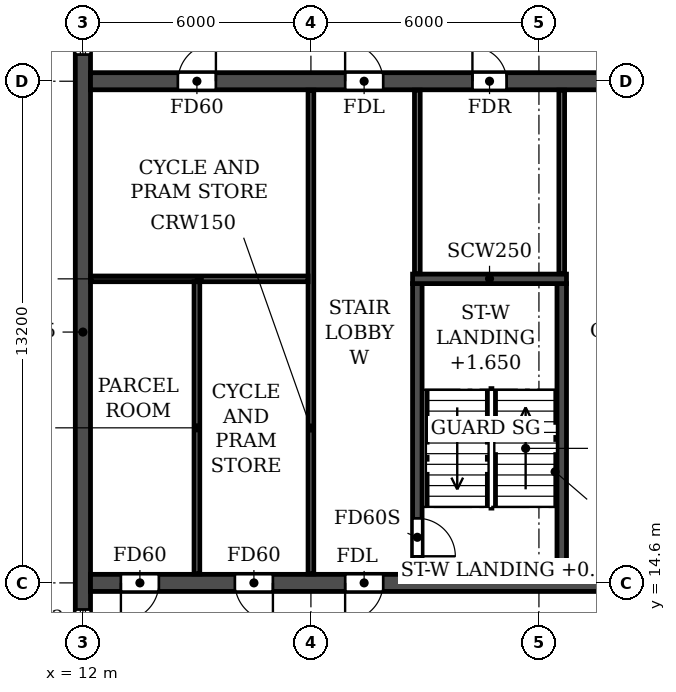
"""IFC4 building model, lengths in metres.
Left out: names, types, materials, properties, quantities, classifications, styles, units other than length and angle.
Written with IfcOpenShell. Run it as: python <this file> out.ifc"""

import sys

from ifc_helpers import new_model, si_unit, direction, frame, frame_2d, origin, place, context, subcontext, project, spatial, rectangle, extrude, element, fill, save


model = new_model("IFC4")
c1 = context("Model", 3, precision=1e-05, world=origin(), true_north=direction((0.0, 1.0)))
c2 = subcontext(c1, "Body", "Model", "MODEL_VIEW")
j1 = project(units=[si_unit("LENGTHUNIT", "METRE"), si_unit("PLANEANGLEUNIT", "RADIAN")], contexts=[c1])
p1 = place(None, origin())
s1 = spatial("IfcSite", under=j1, at=p1, CompositionType="ELEMENT")
p2 = place(p1, origin())
s2 = spatial("IfcBuilding", under=s1, at=p2, CompositionType="ELEMENT")
p3 = place(p2, frame((0.0, 0.0, 142.2)))
s3 = spatial("IfcBuildingStorey", under=s2, at=p3, CompositionType="ELEMENT", Elevation=142.2)
p4 = place(p3, frame((12.0, 4.683, 0.0), z_axis=(0.0, 0.0, 1.0), x_axis=(0.0, 1.0, 0.0)))
e1 = element("IfcWall", 1, at=p4, inside=s3, PredefinedType="SHEAR", context=c2, shape_type="SweptSolid", body=[
    extrude(rectangle(XDim=33.034, YDim=0.4, at=frame_2d((16.517, 0.0))), origin(), (0.0, 0.0, 1.0), 3.07),
])
p5 = place(p4, frame((23.817, 0.0, 0.9)))
e2 = element("IfcOpeningElement", 2, at=p5, cuts=e1, PredefinedType="OPENING", context=c2, shape_type="SweptSolid", body=[
    extrude(rectangle(XDim=1.2, YDim=1.5, at=frame_2d((0.6, 0.75))), frame((0.0, 0.21, 0.0), z_axis=(0.0, -1.0, 0.0), x_axis=(1.0, 0.0, 0.0)), (0.0, 0.0, 1.0), 0.42),
])
p6 = place(p4, frame((8.017, 0.0, 0.9)))
e3 = element("IfcOpeningElement", 3, at=p6, cuts=e1, PredefinedType="OPENING", context=c2, shape_type="SweptSolid", body=[
    extrude(rectangle(XDim=1.2, YDim=1.5, at=frame_2d((0.6, 0.75))), frame((0.0, 0.21, 0.0), z_axis=(0.0, -1.0, 0.0), x_axis=(1.0, 0.0, 0.0)), (0.0, 0.0, 1.0), 0.42),
])
p7 = place(p4, frame((28.293, 0.0, 0.6)))
e4 = element("IfcOpeningElement", 4, at=p7, cuts=e1, PredefinedType="OPENING", context=c2, shape_type="SweptSolid", body=[
    extrude(rectangle(XDim=2.2, YDim=1.8, at=frame_2d((1.1, 0.9))), frame((0.0, 0.21, 0.0), z_axis=(0.0, -1.0, 0.0), x_axis=(1.0, 0.0, 0.0)), (0.0, 0.0, 1.0), 0.42),
])
p8 = place(p4, frame((2.541, 0.0, 0.6)))
e5 = element("IfcOpeningElement", 5, at=p8, cuts=e1, PredefinedType="OPENING", context=c2, shape_type="SweptSolid", body=[
    extrude(rectangle(XDim=2.2, YDim=1.8, at=frame_2d((1.1, 0.9))), frame((0.0, 0.21, 0.0), z_axis=(0.0, -1.0, 0.0), x_axis=(1.0, 0.0, 0.0)), (0.0, 0.0, 1.0), 0.42),
])
p9 = place(p3, frame((12.2, 14.6, 0.0), z_axis=(0.0, 0.0, 1.0), x_axis=(1.0, 0.0, 0.0)))
e6 = element("IfcWall", 6, at=p9, inside=s3, PredefinedType="SOLIDWALL", context=c2, shape_type="SweptSolid", body=[
    extrude(rectangle(XDim=77.6, YDim=0.45, at=frame_2d((38.8, 0.0))), origin(), (0.0, 0.0, 1.0), 3.07),
])
p10 = place(p9, frame((0.8, 0.0, 0.0)))
e7 = element("IfcOpeningElement", 7, at=p10, cuts=e6, PredefinedType="OPENING", context=c2, shape_type="SweptSolid", body=[
    extrude(rectangle(XDim=1.0, YDim=2.1, at=frame_2d((0.5, 1.05))), frame((0.0, 0.235, 0.0), z_axis=(0.0, -1.0, 0.0), x_axis=(1.0, 0.0, 0.0)), (0.0, 0.0, 1.0), 0.47),
])
p11 = place(p9, frame((3.8, 0.0, 0.0)))
e8 = element("IfcOpeningElement", 8, at=p11, cuts=e6, PredefinedType="OPENING", context=c2, shape_type="SweptSolid", body=[
    extrude(rectangle(XDim=1.0, YDim=2.1, at=frame_2d((0.5, 1.05))), frame((0.0, 0.235, 0.0), z_axis=(0.0, -1.0, 0.0), x_axis=(1.0, 0.0, 0.0)), (0.0, 0.0, 1.0), 0.47),
])
p12 = place(p9, frame((6.7, 0.0, 0.0)))
e9 = element("IfcOpeningElement", 9, at=p12, cuts=e6, PredefinedType="OPENING", context=c2, shape_type="SweptSolid", body=[
    extrude(rectangle(XDim=1.0, YDim=2.1, at=frame_2d((0.5, 1.05))), frame((0.0, 0.235, 0.0), z_axis=(0.0, -1.0, 0.0), x_axis=(1.0, 0.0, 0.0)), (0.0, 0.0, 1.0), 0.47),
])
p13 = place(p9, frame((14.6, 0.0, 0.0)))
e10 = element("IfcOpeningElement", 10, at=p13, cuts=e6, PredefinedType="OPENING", context=c2, shape_type="SweptSolid", body=[
    extrude(rectangle(XDim=1.0, YDim=2.1, at=frame_2d((0.5, 1.05))), frame((0.0, 0.235, 0.0), z_axis=(0.0, -1.0, 0.0), x_axis=(1.0, 0.0, 0.0)), (0.0, 0.0, 1.0), 0.47),
])
p14 = place(p9, frame((19.2, 0.0, 0.0)))
e11 = element("IfcOpeningElement", 11, at=p14, cuts=e6, PredefinedType="OPENING", context=c2, shape_type="SweptSolid", body=[
    extrude(rectangle(XDim=1.0, YDim=2.1, at=frame_2d((0.5, 1.05))), frame((0.0, 0.235, 0.0), z_axis=(0.0, -1.0, 0.0), x_axis=(1.0, 0.0, 0.0)), (0.0, 0.0, 1.0), 0.47),
])
p15 = place(p9, frame((33.1, 0.0, 0.0)))
e12 = element("IfcOpeningElement", 12, at=p15, cuts=e6, PredefinedType="OPENING", context=c2, shape_type="SweptSolid", body=[
    extrude(rectangle(XDim=1.0, YDim=2.1, at=frame_2d((0.5, 1.05))), frame((0.0, 0.235, 0.0), z_axis=(0.0, -1.0, 0.0), x_axis=(1.0, 0.0, 0.0)), (0.0, 0.0, 1.0), 0.47),
])
p16 = place(p9, frame((38.3, 0.0, 0.0)))
e13 = element("IfcOpeningElement", 13, at=p16, cuts=e6, PredefinedType="OPENING", context=c2, shape_type="SweptSolid", body=[
    extrude(rectangle(XDim=1.0, YDim=2.1, at=frame_2d((0.5, 1.05))), frame((0.0, 0.235, 0.0), z_axis=(0.0, -1.0, 0.0), x_axis=(1.0, 0.0, 0.0)), (0.0, 0.0, 1.0), 0.47),
])
p17 = place(p9, frame((40.9, 0.0, 0.0)))
e14 = element("IfcOpeningElement", 14, at=p17, cuts=e6, PredefinedType="OPENING", context=c2, shape_type="SweptSolid", body=[
    extrude(rectangle(XDim=1.0, YDim=2.1, at=frame_2d((0.5, 1.05))), frame((0.0, 0.235, 0.0), z_axis=(0.0, -1.0, 0.0), x_axis=(1.0, 0.0, 0.0)), (0.0, 0.0, 1.0), 0.47),
])
p18 = place(p9, frame((44.8, 0.0, 0.0)))
e15 = element("IfcOpeningElement", 15, at=p18, cuts=e6, PredefinedType="OPENING", context=c2, shape_type="SweptSolid", body=[
    extrude(rectangle(XDim=1.0, YDim=2.1, at=frame_2d((0.5, 1.05))), frame((0.0, 0.235, 0.0), z_axis=(0.0, -1.0, 0.0), x_axis=(1.0, 0.0, 0.0)), (0.0, 0.0, 1.0), 0.47),
])
p19 = place(p9, frame((57.4, 0.0, 0.0)))
e16 = element("IfcOpeningElement", 16, at=p19, cuts=e6, PredefinedType="OPENING", context=c2, shape_type="SweptSolid", body=[
    extrude(rectangle(XDim=1.0, YDim=2.1, at=frame_2d((0.5, 1.05))), frame((0.0, 0.235, 0.0), z_axis=(0.0, -1.0, 0.0), x_axis=(1.0, 0.0, 0.0)), (0.0, 0.0, 1.0), 0.47),
])
p20 = place(p9, frame((62.0, 0.0, 0.0)))
e17 = element("IfcOpeningElement", 17, at=p20, cuts=e6, PredefinedType="OPENING", context=c2, shape_type="SweptSolid", body=[
    extrude(rectangle(XDim=1.0, YDim=2.1, at=frame_2d((0.5, 1.05))), frame((0.0, 0.235, 0.0), z_axis=(0.0, -1.0, 0.0), x_axis=(1.0, 0.0, 0.0)), (0.0, 0.0, 1.0), 0.47),
])
p21 = place(p9, frame((69.9, 0.0, 0.0)))
e18 = element("IfcOpeningElement", 18, at=p21, cuts=e6, PredefinedType="OPENING", context=c2, shape_type="SweptSolid", body=[
    extrude(rectangle(XDim=1.0, YDim=2.1, at=frame_2d((0.5, 1.05))), frame((0.0, 0.235, 0.0), z_axis=(0.0, -1.0, 0.0), x_axis=(1.0, 0.0, 0.0)), (0.0, 0.0, 1.0), 0.47),
])
p22 = place(p9, frame((72.8, 0.0, 0.0)))
e19 = element("IfcOpeningElement", 19, at=p22, cuts=e6, PredefinedType="OPENING", context=c2, shape_type="SweptSolid", body=[
    extrude(rectangle(XDim=1.0, YDim=2.1, at=frame_2d((0.5, 1.05))), frame((0.0, 0.235, 0.0), z_axis=(0.0, -1.0, 0.0), x_axis=(1.0, 0.0, 0.0)), (0.0, 0.0, 1.0), 0.47),
])
p23 = place(p9, frame((75.8, 0.0, 0.0)))
e20 = element("IfcOpeningElement", 20, at=p23, cuts=e6, PredefinedType="OPENING", context=c2, shape_type="SweptSolid", body=[
    extrude(rectangle(XDim=1.0, YDim=2.1, at=frame_2d((0.5, 1.05))), frame((0.0, 0.235, 0.0), z_axis=(0.0, -1.0, 0.0), x_axis=(1.0, 0.0, 0.0)), (0.0, 0.0, 1.0), 0.47),
])
p24 = place(p3, frame((12.2, 27.8, 0.0), z_axis=(0.0, 0.0, 1.0), x_axis=(1.0, 0.0, 0.0)))
e21 = element("IfcWall", 21, at=p24, inside=s3, PredefinedType="SOLIDWALL", context=c2, shape_type="SweptSolid", body=[
    extrude(rectangle(XDim=77.6, YDim=0.45, at=frame_2d((38.8, 0.0))), origin(), (0.0, 0.0, 1.0), 3.07),
])
p25 = place(p24, frame((2.3, 0.0, 0.0)))
e22 = element("IfcOpeningElement", 22, at=p25, cuts=e21, PredefinedType="OPENING", context=c2, shape_type="SweptSolid", body=[
    extrude(rectangle(XDim=1.0, YDim=2.1, at=frame_2d((0.5, 1.05))), frame((0.0, 0.235, 0.0), z_axis=(0.0, -1.0, 0.0), x_axis=(1.0, 0.0, 0.0)), (0.0, 0.0, 1.0), 0.47),
])
p26 = place(p24, frame((6.7, 0.0, 0.0)))
e23 = element("IfcOpeningElement", 23, at=p26, cuts=e21, PredefinedType="OPENING", context=c2, shape_type="SweptSolid", body=[
    extrude(rectangle(XDim=1.0, YDim=2.1, at=frame_2d((0.5, 1.05))), frame((0.0, 0.235, 0.0), z_axis=(0.0, -1.0, 0.0), x_axis=(1.0, 0.0, 0.0)), (0.0, 0.0, 1.0), 0.47),
])
p27 = place(p24, frame((10.05, 0.0, 0.0)))
e24 = element("IfcOpeningElement", 24, at=p27, cuts=e21, PredefinedType="OPENING", context=c2, shape_type="SweptSolid", body=[
    extrude(rectangle(XDim=0.9, YDim=2.1, at=frame_2d((0.45, 1.05))), frame((0.0, 0.235, 0.0), z_axis=(0.0, -1.0, 0.0), x_axis=(1.0, 0.0, 0.0)), (0.0, 0.0, 1.0), 0.47),
])
p28 = place(p24, frame((19.25, 0.0, 0.0)))
e25 = element("IfcOpeningElement", 25, at=p28, cuts=e21, PredefinedType="OPENING", context=c2, shape_type="SweptSolid", body=[
    extrude(rectangle(XDim=0.9, YDim=2.1, at=frame_2d((0.45, 1.05))), frame((0.0, 0.235, 0.0), z_axis=(0.0, -1.0, 0.0), x_axis=(1.0, 0.0, 0.0)), (0.0, 0.0, 1.0), 0.47),
])
p29 = place(p24, frame((23.7, 0.0, 0.0)))
e26 = element("IfcOpeningElement", 26, at=p29, cuts=e21, PredefinedType="OPENING", context=c2, shape_type="SweptSolid", body=[
    extrude(rectangle(XDim=1.0, YDim=2.1, at=frame_2d((0.5, 1.05))), frame((0.0, 0.235, 0.0), z_axis=(0.0, -1.0, 0.0), x_axis=(1.0, 0.0, 0.0)), (0.0, 0.0, 1.0), 0.47),
])
p30 = place(p24, frame((28.9, 0.0, 0.0)))
e27 = element("IfcOpeningElement", 27, at=p30, cuts=e21, PredefinedType="OPENING", context=c2, shape_type="SweptSolid", body=[
    extrude(rectangle(XDim=1.0, YDim=2.1, at=frame_2d((0.5, 1.05))), frame((0.0, 0.235, 0.0), z_axis=(0.0, -1.0, 0.0), x_axis=(1.0, 0.0, 0.0)), (0.0, 0.0, 1.0), 0.47),
])
p31 = place(p24, frame((35.4, 0.0, 0.0)))
e28 = element("IfcOpeningElement", 28, at=p31, cuts=e21, PredefinedType="OPENING", context=c2, shape_type="SweptSolid", body=[
    extrude(rectangle(XDim=1.0, YDim=2.1, at=frame_2d((0.5, 1.05))), frame((0.0, 0.235, 0.0), z_axis=(0.0, -1.0, 0.0), x_axis=(1.0, 0.0, 0.0)), (0.0, 0.0, 1.0), 0.47),
])
p32 = place(p24, frame((38.3, 0.0, 0.0)))
e29 = element("IfcOpeningElement", 29, at=p32, cuts=e21, PredefinedType="OPENING", context=c2, shape_type="SweptSolid", body=[
    extrude(rectangle(XDim=1.0, YDim=2.1, at=frame_2d((0.5, 1.05))), frame((0.0, 0.235, 0.0), z_axis=(0.0, -1.0, 0.0), x_axis=(1.0, 0.0, 0.0)), (0.0, 0.0, 1.0), 0.47),
])
p33 = place(p24, frame((41.2, 0.0, 0.0)))
e30 = element("IfcOpeningElement", 30, at=p33, cuts=e21, PredefinedType="OPENING", context=c2, shape_type="SweptSolid", body=[
    extrude(rectangle(XDim=1.0, YDim=2.1, at=frame_2d((0.5, 1.05))), frame((0.0, 0.235, 0.0), z_axis=(0.0, -1.0, 0.0), x_axis=(1.0, 0.0, 0.0)), (0.0, 0.0, 1.0), 0.47),
])
p34 = place(p24, frame((43.8, 0.0, 0.0)))
e31 = element("IfcOpeningElement", 31, at=p34, cuts=e21, PredefinedType="OPENING", context=c2, shape_type="SweptSolid", body=[
    extrude(rectangle(XDim=1.0, YDim=2.1, at=frame_2d((0.5, 1.05))), frame((0.0, 0.235, 0.0), z_axis=(0.0, -1.0, 0.0), x_axis=(1.0, 0.0, 0.0)), (0.0, 0.0, 1.0), 0.47),
])
p35 = place(p24, frame((46.4, 0.0, 0.0)))
e32 = element("IfcOpeningElement", 32, at=p35, cuts=e21, PredefinedType="OPENING", context=c2, shape_type="SweptSolid", body=[
    extrude(rectangle(XDim=1.0, YDim=2.1, at=frame_2d((0.5, 1.05))), frame((0.0, 0.235, 0.0), z_axis=(0.0, -1.0, 0.0), x_axis=(1.0, 0.0, 0.0)), (0.0, 0.0, 1.0), 0.47),
])
p36 = place(p24, frame((49.0, 0.0, 0.0)))
e33 = element("IfcOpeningElement", 33, at=p36, cuts=e21, PredefinedType="OPENING", context=c2, shape_type="SweptSolid", body=[
    extrude(rectangle(XDim=1.0, YDim=2.1, at=frame_2d((0.5, 1.05))), frame((0.0, 0.235, 0.0), z_axis=(0.0, -1.0, 0.0), x_axis=(1.0, 0.0, 0.0)), (0.0, 0.0, 1.0), 0.47),
])
p37 = place(p24, frame((52.9, 0.0, 0.0)))
e34 = element("IfcOpeningElement", 34, at=p37, cuts=e21, PredefinedType="OPENING", context=c2, shape_type="SweptSolid", body=[
    extrude(rectangle(XDim=1.0, YDim=2.1, at=frame_2d((0.5, 1.05))), frame((0.0, 0.235, 0.0), z_axis=(0.0, -1.0, 0.0), x_axis=(1.0, 0.0, 0.0)), (0.0, 0.0, 1.0), 0.47),
])
p38 = place(p24, frame((57.45, 0.0, 0.0)))
e35 = element("IfcOpeningElement", 35, at=p38, cuts=e21, PredefinedType="OPENING", context=c2, shape_type="SweptSolid", body=[
    extrude(rectangle(XDim=0.9, YDim=2.1, at=frame_2d((0.45, 1.05))), frame((0.0, 0.235, 0.0), z_axis=(0.0, -1.0, 0.0), x_axis=(1.0, 0.0, 0.0)), (0.0, 0.0, 1.0), 0.47),
])
p39 = place(p24, frame((66.65, 0.0, 0.0)))
e36 = element("IfcOpeningElement", 36, at=p39, cuts=e21, PredefinedType="OPENING", context=c2, shape_type="SweptSolid", body=[
    extrude(rectangle(XDim=0.9, YDim=2.1, at=frame_2d((0.45, 1.05))), frame((0.0, 0.235, 0.0), z_axis=(0.0, -1.0, 0.0), x_axis=(1.0, 0.0, 0.0)), (0.0, 0.0, 1.0), 0.47),
])
p40 = place(p24, frame((69.9, 0.0, 0.0)))
e37 = element("IfcOpeningElement", 37, at=p40, cuts=e21, PredefinedType="OPENING", context=c2, shape_type="SweptSolid", body=[
    extrude(rectangle(XDim=1.0, YDim=2.1, at=frame_2d((0.5, 1.05))), frame((0.0, 0.235, 0.0), z_axis=(0.0, -1.0, 0.0), x_axis=(1.0, 0.0, 0.0)), (0.0, 0.0, 1.0), 0.47),
])
p41 = place(p24, frame((74.3, 0.0, 0.0)))
e38 = element("IfcOpeningElement", 38, at=p41, cuts=e21, PredefinedType="OPENING", context=c2, shape_type="SweptSolid", body=[
    extrude(rectangle(XDim=1.0, YDim=2.1, at=frame_2d((0.5, 1.05))), frame((0.0, 0.235, 0.0), z_axis=(0.0, -1.0, 0.0), x_axis=(1.0, 0.0, 0.0)), (0.0, 0.0, 1.0), 0.47),
])
p42 = place(p3, frame((20.8, 14.825, 0.0), z_axis=(0.0, 0.0, 1.0), x_axis=(0.0, 1.0, 0.0)))
e39 = element("IfcWall", 39, at=p42, inside=s3, PredefinedType="SOLIDWALL", context=c2, shape_type="SweptSolid", body=[
    extrude(rectangle(XDim=7.65, YDim=0.25, at=frame_2d((3.825, 0.0))), origin(), (0.0, 0.0, 1.0), 3.07),
])
p43 = place(p42, frame((0.475, 0.0, 0.0)))
e40 = element("IfcOpeningElement", 40, at=p43, cuts=e39, PredefinedType="OPENING", context=c2, shape_type="SweptSolid", body=[
    extrude(rectangle(XDim=1.0, YDim=2.1, at=frame_2d((0.5, 1.05))), frame((0.0, 0.135, 0.0), z_axis=(0.0, -1.0, 0.0), x_axis=(1.0, 0.0, 0.0)), (0.0, 0.0, 1.0), 0.27),
])
p44 = place(p3, frame((24.6, 14.825, 0.0), z_axis=(0.0, 0.0, 1.0), x_axis=(0.0, 1.0, 0.0)))
e41 = element("IfcWall", 41, at=p44, inside=s3, PredefinedType="SOLIDWALL", context=c2, shape_type="SweptSolid", body=[
    extrude(rectangle(XDim=7.65, YDim=0.25, at=frame_2d((3.825, 0.0))), origin(), (0.0, 0.0, 1.0), 3.07),
])
p45 = place(p3, frame((20.675, 22.6, 0.0), z_axis=(0.0, 0.0, 1.0), x_axis=(1.0, 0.0, 0.0)))
e42 = element("IfcWall", 42, at=p45, inside=s3, PredefinedType="SOLIDWALL", context=c2, shape_type="SweptSolid", body=[
    extrude(rectangle(XDim=4.05, YDim=0.25, at=frame_2d((2.025, 0.0))), origin(), (0.0, 0.0, 1.0), 3.07),
])
p46 = place(p3, frame((18.0, 14.835, 0.0), z_axis=(0.0, 0.0, 1.0), x_axis=(0.0, 1.0, 0.0)))
e43 = element("IfcWall", 43, at=p46, inside=s3, PredefinedType="PARTITIONING", context=c2, shape_type="SweptSolid", body=[
    extrude(rectangle(XDim=12.73, YDim=0.15, at=frame_2d((6.365, 0.0))), origin(), (0.0, 0.0, 1.0), 3.07),
])
p47 = place(p3, frame((12.21, 22.6, 0.0), z_axis=(0.0, 0.0, 1.0), x_axis=(1.0, 0.0, 0.0)))
e44 = element("IfcWall", 44, at=p47, inside=s3, PredefinedType="PARTITIONING", context=c2, shape_type="SweptSolid", body=[
    extrude(rectangle(XDim=5.715, YDim=0.15, at=frame_2d((2.857, 0.0))), origin(), (0.0, 0.0, 1.0), 3.07),
])
p48 = place(p3, frame((15.0, 14.835, 0.0), z_axis=(0.0, 0.0, 1.0), x_axis=(0.0, 1.0, 0.0)))
e45 = element("IfcWall", 45, at=p48, inside=s3, PredefinedType="PARTITIONING", context=c2, shape_type="SweptSolid", body=[
    extrude(rectangle(XDim=7.69, YDim=0.15, at=frame_2d((3.845, 0.0))), origin(), (0.0, 0.0, 1.0), 3.07),
])
for number, where, z_axis, x_axis in (
    (46, (20.8, 22.735, 0.0), (0.0, 0.0, 1.0), (0.0, 1.0, 0.0)),
    (47, (24.6, 22.735, 0.0), (0.0, 0.0, 1.0), (0.0, 1.0, 0.0)),
):
    element("IfcWall", number, at=place(p3, frame(where, z_axis=z_axis, x_axis=x_axis)), inside=s3, PredefinedType="PARTITIONING", context=c2, shape_type="SweptSolid", body=[
        extrude(rectangle(XDim=4.83, YDim=0.15, at=frame_2d((2.415, 0.0))), origin(), (0.0, 0.0, 1.0), 3.07),
    ])
p49 = place(p5, origin())
e48 = element("IfcWindow", 48, at=p49, inside=s3, PartitioningType="SINGLE_PANEL", PredefinedType="WINDOW", context=c2, shape_type="SweptSolid", body=[
    extrude(rectangle(XDim=1.2, YDim=1.5, at=frame_2d((0.6, 0.75))), frame((0.0, 0.03, 0.0), z_axis=(0.0, -1.0, 0.0), x_axis=(1.0, 0.0, 0.0)), (0.0, 0.0, 1.0), 0.06),
])
fill(e2, e48)
p50 = place(p6, origin())
e49 = element("IfcWindow", 49, at=p50, inside=s3, PartitioningType="SINGLE_PANEL", PredefinedType="WINDOW", context=c2, shape_type="SweptSolid", body=[
    extrude(rectangle(XDim=1.2, YDim=1.5, at=frame_2d((0.6, 0.75))), frame((0.0, 0.03, 0.0), z_axis=(0.0, -1.0, 0.0), x_axis=(1.0, 0.0, 0.0)), (0.0, 0.0, 1.0), 0.06),
])
fill(e3, e49)
p51 = place(p25, origin())
e50 = element("IfcDoor", 50, at=p51, inside=s3, OperationType="SINGLE_SWING_RIGHT", PredefinedType="DOOR", context=c2, shape_type="SweptSolid", body=[
    extrude(rectangle(XDim=1.0, YDim=2.1, at=frame_2d((0.5, 1.05))), frame((0.0, 0.025, 0.0), z_axis=(0.0, -1.0, 0.0), x_axis=(1.0, 0.0, 0.0)), (0.0, 0.0, 1.0), 0.05),
])
fill(e22, e50)
p52 = place(p26, origin())
e51 = element("IfcDoor", 51, at=p52, inside=s3, OperationType="SINGLE_SWING_LEFT", PredefinedType="DOOR", context=c2, shape_type="SweptSolid", body=[
    extrude(rectangle(XDim=1.0, YDim=2.1, at=frame_2d((0.5, 1.05))), frame((0.0, 0.025, 0.0), z_axis=(0.0, -1.0, 0.0), x_axis=(1.0, 0.0, 0.0)), (0.0, 0.0, 1.0), 0.05),
])
fill(e23, e51)
p53 = place(p27, origin())
e52 = element("IfcDoor", 52, at=p53, inside=s3, OperationType="SINGLE_SWING_LEFT", PredefinedType="DOOR", context=c2, shape_type="SweptSolid", body=[
    extrude(rectangle(XDim=0.9, YDim=2.1, at=frame_2d((0.45, 1.05))), frame((0.0, 0.025, 0.0), z_axis=(0.0, -1.0, 0.0), x_axis=(1.0, 0.0, 0.0)), (0.0, 0.0, 1.0), 0.05),
])
fill(e24, e52)
p54 = place(p10, frame((1.0, 0.0, 0.0), z_axis=(0.0, 0.0, 1.0), x_axis=(-1.0, 0.0, 0.0)))
e53 = element("IfcDoor", 53, at=p54, inside=s3, OperationType="SINGLE_SWING_RIGHT", PredefinedType="DOOR", context=c2, shape_type="SweptSolid", body=[
    extrude(rectangle(XDim=1.0, YDim=2.1, at=frame_2d((0.5, 1.05))), frame((0.0, 0.025, 0.0), z_axis=(0.0, -1.0, 0.0), x_axis=(1.0, 0.0, 0.0)), (0.0, 0.0, 1.0), 0.05),
])
fill(e7, e53)
p55 = place(p11, frame((1.0, 0.0, 0.0), z_axis=(0.0, 0.0, 1.0), x_axis=(-1.0, 0.0, 0.0)))
e54 = element("IfcDoor", 54, at=p55, inside=s3, OperationType="SINGLE_SWING_LEFT", PredefinedType="DOOR", context=c2, shape_type="SweptSolid", body=[
    extrude(rectangle(XDim=1.0, YDim=2.1, at=frame_2d((0.5, 1.05))), frame((0.0, 0.025, 0.0), z_axis=(0.0, -1.0, 0.0), x_axis=(1.0, 0.0, 0.0)), (0.0, 0.0, 1.0), 0.05),
])
fill(e8, e54)
p56 = place(p12, frame((1.0, 0.0, 0.0), z_axis=(0.0, 0.0, 1.0), x_axis=(-1.0, 0.0, 0.0)))
e55 = element("IfcDoor", 55, at=p56, inside=s3, OperationType="SINGLE_SWING_RIGHT", PredefinedType="DOOR", context=c2, shape_type="SweptSolid", body=[
    extrude(rectangle(XDim=1.0, YDim=2.1, at=frame_2d((0.5, 1.05))), frame((0.0, 0.025, 0.0), z_axis=(0.0, -1.0, 0.0), x_axis=(1.0, 0.0, 0.0)), (0.0, 0.0, 1.0), 0.05),
])
fill(e9, e55)
p57 = place(p43, frame((1.0, 0.0, 0.0), z_axis=(0.0, 0.0, 1.0), x_axis=(-1.0, 0.0, 0.0)))
e56 = element("IfcDoor", 56, at=p57, inside=s3, OperationType="SINGLE_SWING_RIGHT", PredefinedType="DOOR", context=c2, shape_type="SweptSolid", body=[
    extrude(rectangle(XDim=1.0, YDim=2.1, at=frame_2d((0.5, 1.05))), frame((0.0, 0.025, 0.0), z_axis=(0.0, -1.0, 0.0), x_axis=(1.0, 0.0, 0.0)), (0.0, 0.0, 1.0), 0.05),
])
fill(e40, e56)
save(model, sys.argv[1])
